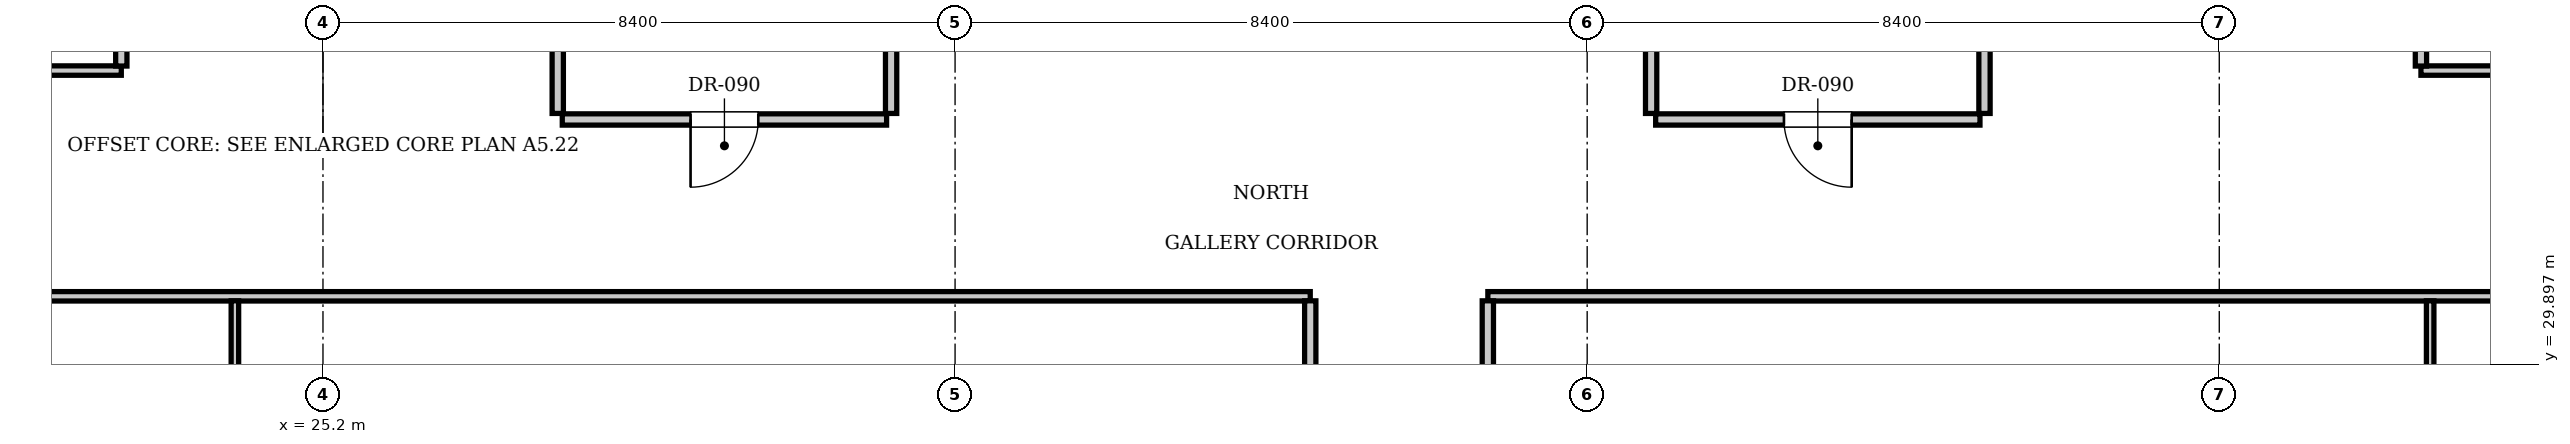
"""IFC4 building model, lengths in metres.
Left out: names, types, materials, properties, quantities, classifications, styles, units other than length and angle.
Written with IfcOpenShell. Run it as: python <this file> out.ifc"""

import sys

from ifc_helpers import new_model, si_unit, direction, frame, frame_2d, origin, place, context, subcontext, project, spatial, rectangle, extrude, element, fill, save


model = new_model("IFC4")
c1 = context("Model", 3, precision=1e-05, world=origin(), true_north=direction((0.0, 1.0)))
c2 = subcontext(c1, "Body", "Model", "MODEL_VIEW")
j1 = project(units=[si_unit("LENGTHUNIT", "METRE"), si_unit("PLANEANGLEUNIT", "RADIAN")], contexts=[c1])
p1 = place(None, origin())
s1 = spatial("IfcSite", under=j1, at=p1, CompositionType="ELEMENT")
p2 = place(p1, origin())
s2 = spatial("IfcBuilding", under=s1, at=p2, CompositionType="ELEMENT")
p3 = place(p2, frame((0.0, 0.0, 204.4)))
s3 = spatial("IfcBuildingStorey", under=s2, at=p3, CompositionType="ELEMENT", Elevation=204.4)
for number, where, z_axis, x_axis in (
    (1, (28.32, 33.23, 0.0), (0.0, 0.0, 1.0), (0.0, 1.0, 0.0)),
    (2, (32.75, 33.23, 0.0), (0.0, 0.0, 1.0), (0.0, 1.0, 0.0)),
):
    element("IfcWall", number, at=place(p3, frame(where, z_axis=z_axis, x_axis=x_axis)), inside=s3, PredefinedType="PARTITIONING", context=c2, shape_type="SweptSolid", body=[
        extrude(rectangle(XDim=2.89, YDim=0.15, at=frame_2d((1.445, 0.0))), origin(), (0.0, 0.0, 1.0), 3.61),
    ])
p4 = place(p3, frame((28.38, 33.15, 0.0), z_axis=(0.0, 0.0, 1.0), x_axis=(1.0, 0.0, 0.0)))
e3 = element("IfcWall", 3, at=p4, inside=s3, PredefinedType="PARTITIONING", context=c2, shape_type="SweptSolid", body=[
    extrude(rectangle(XDim=4.31, YDim=0.15, at=frame_2d((2.155, 0.0))), origin(), (0.0, 0.0, 1.0), 3.61),
])
p5 = place(p4, frame((1.705, 0.0, 0.0)))
e4 = element("IfcOpeningElement", 4, at=p5, cuts=e3, PredefinedType="OPENING", context=c2, shape_type="SweptSolid", body=[
    extrude(rectangle(XDim=0.9, YDim=2.1, at=frame_2d((0.45, 1.05))), frame((0.0, 0.085, 0.0), z_axis=(0.0, -1.0, 0.0), x_axis=(1.0, 0.0, 0.0)), (0.0, 0.0, 1.0), 0.17),
])
for number, where, z_axis, x_axis in (
    (5, (42.85, 33.23, 0.0), (0.0, 0.0, 1.0), (0.0, 1.0, 0.0)),
    (6, (47.28, 33.23, 0.0), (0.0, 0.0, 1.0), (0.0, 1.0, 0.0)),
):
    element("IfcWall", number, at=place(p3, frame(where, z_axis=z_axis, x_axis=x_axis)), inside=s3, PredefinedType="PARTITIONING", context=c2, shape_type="SweptSolid", body=[
        extrude(rectangle(XDim=2.89, YDim=0.15, at=frame_2d((1.445, 0.0))), origin(), (0.0, 0.0, 1.0), 3.61),
    ])
p6 = place(p3, frame((42.91, 33.15, 0.0), z_axis=(0.0, 0.0, 1.0), x_axis=(1.0, 0.0, 0.0)))
e7 = element("IfcWall", 7, at=p6, inside=s3, PredefinedType="PARTITIONING", context=c2, shape_type="SweptSolid", body=[
    extrude(rectangle(XDim=4.31, YDim=0.15, at=frame_2d((2.155, 0.0))), origin(), (0.0, 0.0, 1.0), 3.61),
])
p7 = place(p6, frame((1.705, 0.0, 0.0)))
e8 = element("IfcOpeningElement", 8, at=p7, cuts=e7, PredefinedType="OPENING", context=c2, shape_type="SweptSolid", body=[
    extrude(rectangle(XDim=0.9, YDim=2.1, at=frame_2d((0.45, 1.05))), frame((0.0, 0.085, 0.0), z_axis=(0.0, -1.0, 0.0), x_axis=(1.0, 0.0, 0.0)), (0.0, 0.0, 1.0), 0.17),
])
p8 = place(p3, frame((13.2, 30.8, 0.0), z_axis=(0.0, 0.0, 1.0), x_axis=(1.0, 0.0, 0.0)))
e9 = element("IfcWall", 9, at=p8, inside=s3, PredefinedType="PARTITIONING", context=c2, shape_type="SweptSolid", body=[
    extrude(rectangle(XDim=25.12, YDim=0.125, at=frame_2d((12.56, 0.0))), origin(), (0.0, 0.0, 1.0), 3.61),
])
p9 = place(p3, frame((40.68, 30.8, 0.0), z_axis=(0.0, 0.0, 1.0), x_axis=(1.0, 0.0, 0.0)))
e10 = element("IfcWall", 10, at=p9, inside=s3, PredefinedType="PARTITIONING", context=c2, shape_type="SweptSolid", body=[
    extrude(rectangle(XDim=21.72, YDim=0.125, at=frame_2d((10.86, 0.0))), origin(), (0.0, 0.0, 1.0), 3.61),
])
p10 = place(p3, frame((38.32, 25.6, 0.0), z_axis=(0.0, 0.0, 1.0), x_axis=(0.0, 1.0, 0.0)))
e11 = element("IfcWall", 11, at=p10, inside=s3, PredefinedType="PARTITIONING", context=c2, shape_type="SweptSolid", body=[
    extrude(rectangle(XDim=5.14, YDim=0.15, at=frame_2d((2.57, 0.0))), origin(), (0.0, 0.0, 1.0), 3.61),
])
p11 = place(p10, frame((2.095, 0.0, 0.0)))
e12 = element("IfcOpeningElement", 12, at=p11, cuts=e11, PredefinedType="OPENING", context=c2, shape_type="SweptSolid", body=[
    extrude(rectangle(XDim=0.95, YDim=2.15, at=frame_2d((0.475, 1.075))), frame((0.0, 0.085, 0.0), z_axis=(0.0, -1.0, 0.0), x_axis=(1.0, 0.0, 0.0)), (0.0, 0.0, 1.0), 0.17),
])
p12 = place(p3, frame((24.03, 23.31, 0.0), z_axis=(0.0, 0.0, 1.0), x_axis=(0.0, 1.0, 0.0)))
e13 = element("IfcWall", 13, at=p12, inside=s3, PredefinedType="PARTITIONING", context=c2, shape_type="SweptSolid", body=[
    extrude(rectangle(XDim=7.43, YDim=0.1, at=frame_2d((3.715, 0.0))), origin(), (0.0, 0.0, 1.0), 3.61),
])
p13 = place(p12, frame((4.945, 0.0, 0.0)))
e14 = element("IfcOpeningElement", 14, at=p13, cuts=e13, PredefinedType="OPENING", context=c2, shape_type="SweptSolid", body=[
    extrude(rectangle(XDim=0.9, YDim=2.1, at=frame_2d((0.45, 1.05))), frame((0.0, 0.06, 0.0), z_axis=(0.0, -1.0, 0.0), x_axis=(1.0, 0.0, 0.0)), (0.0, 0.0, 1.0), 0.12),
])
p14 = place(p3, frame((40.68, 25.6, 0.0), z_axis=(0.0, 0.0, 1.0), x_axis=(0.0, 1.0, 0.0)))
e15 = element("IfcWall", 15, at=p14, inside=s3, PredefinedType="PARTITIONING", context=c2, shape_type="SweptSolid", body=[
    extrude(rectangle(XDim=5.14, YDim=0.15, at=frame_2d((2.57, 0.0))), origin(), (0.0, 0.0, 1.0), 3.61),
])
p15 = place(p14, frame((2.095, 0.0, 0.0)))
e16 = element("IfcOpeningElement", 16, at=p15, cuts=e15, PredefinedType="OPENING", context=c2, shape_type="SweptSolid", body=[
    extrude(rectangle(XDim=0.95, YDim=2.15, at=frame_2d((0.475, 1.075))), frame((0.0, 0.085, 0.0), z_axis=(0.0, -1.0, 0.0), x_axis=(1.0, 0.0, 0.0)), (0.0, 0.0, 1.0), 0.17),
])
p16 = place(p3, frame((53.202, 23.31, 0.0), z_axis=(0.0, 0.0, 1.0), x_axis=(0.0, 1.0, 0.0)))
e17 = element("IfcWall", 17, at=p16, inside=s3, PredefinedType="PARTITIONING", context=c2, shape_type="SweptSolid", body=[
    extrude(rectangle(XDim=7.43, YDim=0.1, at=frame_2d((3.715, 0.0))), origin(), (0.0, 0.0, 1.0), 3.61),
])
p17 = place(p16, frame((3.265, 0.0, 0.0)))
e18 = element("IfcOpeningElement", 18, at=p17, cuts=e17, PredefinedType="OPENING", context=c2, shape_type="SweptSolid", body=[
    extrude(rectangle(XDim=0.9, YDim=2.1, at=frame_2d((0.45, 1.05))), frame((0.0, 0.06, 0.0), z_axis=(0.0, -1.0, 0.0), x_axis=(1.0, 0.0, 0.0)), (0.0, 0.0, 1.0), 0.12),
])
p18 = place(p3, frame((13.2, 33.8, 0.0), z_axis=(0.0, 0.0, 1.0), x_axis=(1.0, 0.0, 0.0)))
e19 = element("IfcWall", 19, at=p18, inside=s3, PredefinedType="PARTITIONING", context=c2, shape_type="SweptSolid", body=[
    extrude(rectangle(XDim=9.32, YDim=0.125, at=frame_2d((4.66, 0.0))), origin(), (0.0, 0.0, 1.0), 3.61),
])
p19 = place(p3, frame((53.08, 33.8, 0.0), z_axis=(0.0, 0.0, 1.0), x_axis=(1.0, 0.0, 0.0)))
e20 = element("IfcWall", 20, at=p19, inside=s3, PredefinedType="PARTITIONING", context=c2, shape_type="SweptSolid", body=[
    extrude(rectangle(XDim=9.32, YDim=0.125, at=frame_2d((4.66, 0.0))), origin(), (0.0, 0.0, 1.0), 3.61),
])
p20 = place(p3, frame((22.52, 33.86, 0.0), z_axis=(0.0, 0.0, 1.0), x_axis=(0.0, 1.0, 0.0)))
e21 = element("IfcWall", 21, at=p20, inside=s3, PredefinedType="PARTITIONING", context=c2, shape_type="SweptSolid", body=[
    extrude(rectangle(XDim=13.327, YDim=0.15, at=frame_2d((6.664, 0.0))), origin(), (0.0, 0.0, 1.0), 3.61),
])
p21 = place(p20, frame((6.189, 0.0, 0.0)))
e22 = element("IfcOpeningElement", 22, at=p21, cuts=e21, PredefinedType="OPENING", context=c2, shape_type="SweptSolid", body=[
    extrude(rectangle(XDim=0.95, YDim=2.15, at=frame_2d((0.475, 1.075))), frame((0.0, 0.085, 0.0), z_axis=(0.0, -1.0, 0.0), x_axis=(1.0, 0.0, 0.0)), (0.0, 0.0, 1.0), 0.17),
])
p22 = place(p3, frame((53.08, 33.86, 0.0), z_axis=(0.0, 0.0, 1.0), x_axis=(0.0, 1.0, 0.0)))
e23 = element("IfcWall", 23, at=p22, inside=s3, PredefinedType="PARTITIONING", context=c2, shape_type="SweptSolid", body=[
    extrude(rectangle(XDim=13.327, YDim=0.15, at=frame_2d((6.664, 0.0))), origin(), (0.0, 0.0, 1.0), 3.61),
])
p23 = place(p22, frame((6.189, 0.0, 0.0)))
e24 = element("IfcOpeningElement", 24, at=p23, cuts=e23, PredefinedType="OPENING", context=c2, shape_type="SweptSolid", body=[
    extrude(rectangle(XDim=0.95, YDim=2.15, at=frame_2d((0.475, 1.075))), frame((0.0, 0.085, 0.0), z_axis=(0.0, -1.0, 0.0), x_axis=(1.0, 0.0, 0.0)), (0.0, 0.0, 1.0), 0.17),
])
p24 = place(p5, frame((0.9, 0.0, 0.0), z_axis=(0.0, 0.0, 1.0), x_axis=(-1.0, 0.0, 0.0)))
e25 = element("IfcDoor", 25, at=p24, inside=s3, OperationType="SINGLE_SWING_RIGHT", PredefinedType="DOOR", context=c2, shape_type="SweptSolid", body=[
    extrude(rectangle(XDim=0.9, YDim=2.1, at=frame_2d((0.45, 1.05))), frame((0.0, 0.025, 0.0), z_axis=(0.0, -1.0, 0.0), x_axis=(1.0, 0.0, 0.0)), (0.0, 0.0, 1.0), 0.05),
])
fill(e4, e25)
p25 = place(p7, frame((0.9, 0.0, 0.0), z_axis=(0.0, 0.0, 1.0), x_axis=(-1.0, 0.0, 0.0)))
e26 = element("IfcDoor", 26, at=p25, inside=s3, OperationType="SINGLE_SWING_LEFT", PredefinedType="DOOR", context=c2, shape_type="SweptSolid", body=[
    extrude(rectangle(XDim=0.9, YDim=2.1, at=frame_2d((0.45, 1.05))), frame((0.0, 0.025, 0.0), z_axis=(0.0, -1.0, 0.0), x_axis=(1.0, 0.0, 0.0)), (0.0, 0.0, 1.0), 0.05),
])
fill(e8, e26)
save(model, sys.argv[1])
